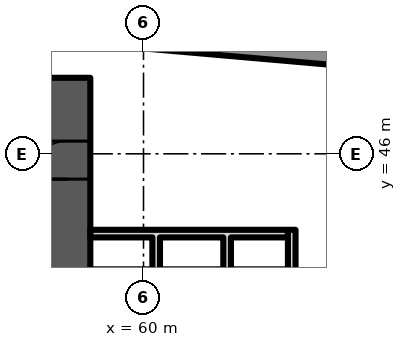
"""IFC4 building model, lengths in metres.
Left out: names, types, materials, properties, quantities, classifications, styles, units other than length and angle.
Written with IfcOpenShell. Run it as: python <this file> out.ifc"""

import sys

from ifc_helpers import new_model, si_unit, direction, frame, frame_2d, origin, place, context, subcontext, project, spatial, polyline, rectangle, outline, extrude, element, fill, save


model = new_model("IFC4")
c1 = context("Model", 3, precision=1e-05, world=origin(), true_north=direction((0.0, 1.0)))
c2 = subcontext(c1, "Body", "Model", "MODEL_VIEW")
j1 = project(units=[si_unit("LENGTHUNIT", "METRE"), si_unit("PLANEANGLEUNIT", "RADIAN")], contexts=[c1])
p1 = place(None, origin())
s1 = spatial("IfcSite", under=j1, at=p1, CompositionType="ELEMENT")
p2 = place(p1, origin())
s2 = spatial("IfcBuilding", under=s1, at=p2, CompositionType="ELEMENT")
p3 = place(p2, frame((0.0, 0.0, 33.0)))
s3 = spatial("IfcBuildingStorey", under=s2, at=p3, CompositionType="ELEMENT", Elevation=33.0)
p4 = place(p3, frame((66.058, 48.469, 0.0), z_axis=(0.0, 0.0, 1.0), x_axis=(-0.996195, 0.087158, 0.0)))
e1 = element("IfcWall", 1, at=p4, inside=s3, PredefinedType="SOLIDWALL", context=c2, shape_type="SweptSolid", body=[
    extrude(rectangle(XDim=6.081, YDim=0.45, at=frame_2d((3.041, 0.0))), origin(), (0.0, 0.0, 1.0), 8.1),
])
p5 = place(p3, frame((58.0, 35.2, 0.0), z_axis=(0.0, 0.0, 1.0), x_axis=(0.0, 1.0, 0.0)))
e2 = element("IfcWall", 2, at=p5, inside=s3, PredefinedType="SHEAR", context=c2, shape_type="SweptSolid", body=[
    extrude(rectangle(XDim=12.8, YDim=1.2, at=frame_2d((6.4, 0.0))), origin(), (0.0, 0.0, 1.0), 8.1),
])
p6 = place(p5, frame((10.134, 0.0, 0.0)))
e3 = element("IfcOpeningElement", 3, at=p6, cuts=e2, PredefinedType="OPENING", context=c2, shape_type="SweptSolid", body=[
    extrude(rectangle(XDim=1.0, YDim=2.1, at=frame_2d((0.5, 1.05))), frame((0.0, 0.61, 0.0), z_axis=(0.0, -1.0, 0.0), x_axis=(1.0, 0.0, 0.0)), (0.0, 0.0, 1.0), 1.22),
])
p7 = place(p5, frame((3.2, 0.0, 0.0)))
e4 = element("IfcOpeningElement", 4, at=p7, cuts=e2, PredefinedType="OPENING", context=c2, shape_type="SweptSolid", body=[
    extrude(rectangle(XDim=1.1, YDim=2.1, at=frame_2d((0.55, 1.05))), frame((0.0, 0.61, 0.0), z_axis=(0.0, -1.0, 0.0), x_axis=(1.0, 0.0, 0.0)), (0.0, 0.0, 1.0), 1.22),
])
p8 = place(p3, origin())
e5 = element("IfcWall", 5, at=p8, inside=s3, PredefinedType="PARTITIONING", context=c2, shape_type="SweptSolid", body=[
    extrude(outline(polyline([(60.433, 40.8), (60.233, 40.8), (60.233, 43.8), (58.6, 43.8), (58.6, 44.0), (63.8, 44.0), (63.8, 43.8), (62.3, 43.8), (62.3, 40.8), (62.1, 40.8), (62.1, 43.8), (60.433, 43.8), (60.433, 40.8)])), origin(), (0.0, 0.0, 1.0), 8.1),
])
p9 = place(p3, frame((63.9, 40.6, 0.0), z_axis=(0.0, 0.0, 1.0), x_axis=(0.0, 1.0, 0.0)))
e6 = element("IfcWall", 6, at=p9, inside=s3, PredefinedType="PARTITIONING", context=c2, shape_type="SweptSolid", body=[
    extrude(rectangle(XDim=3.4, YDim=0.2, at=frame_2d((1.7, 0.0))), origin(), (0.0, 0.0, 1.0), 8.1),
])
p10 = place(p6, origin())
e7 = element("IfcDoor", 7, at=p10, inside=s3, OperationType="SINGLE_SWING_LEFT", PredefinedType="DOOR", context=c2, shape_type="SweptSolid", body=[
    extrude(rectangle(XDim=1.0, YDim=2.1, at=frame_2d((0.5, 1.05))), frame((0.0, 0.6, 0.0), z_axis=(0.0, -1.0, 0.0), x_axis=(1.0, 0.0, 0.0)), (0.0, 0.0, 1.0), 1.199),
])
fill(e3, e7)
save(model, sys.argv[1])
